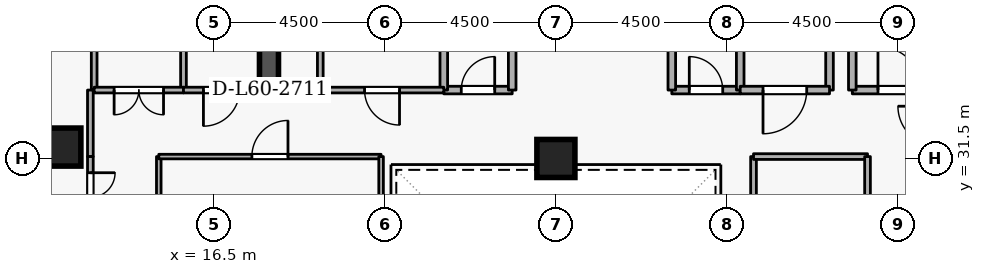
"""IFC4 building model, lengths in metres.
Left out: names, types, materials, properties, quantities, classifications, styles, units other than length and angle.
Written with IfcOpenShell. Run it as: python <this file> out.ifc"""

import sys

from ifc_helpers import new_model, si_unit, direction, frame, frame_2d, origin, origin_2d, place, context, subcontext, project, spatial, rectangle, extrude, element, fill, save


model = new_model("IFC4")
c1 = context("Model", 3, precision=1e-05, world=origin(), true_north=direction((0.0, 1.0)))
c2 = subcontext(c1, "Body", "Model", "MODEL_VIEW")
j1 = project(units=[si_unit("LENGTHUNIT", "METRE"), si_unit("PLANEANGLEUNIT", "RADIAN")], contexts=[c1])
p1 = place(None, origin())
s1 = spatial("IfcSite", under=j1, at=p1, CompositionType="ELEMENT")
p2 = place(p1, origin())
s2 = spatial("IfcBuilding", under=s1, at=p2, CompositionType="ELEMENT")
p3 = place(p2, frame((0.0, 0.0, 225.9)))
s3 = spatial("IfcBuildingStorey", under=s2, at=p3, CompositionType="ELEMENT", Elevation=225.9)
p4 = place(p3, frame((17.95, 33.1, 0.0), z_axis=(0.0, 0.0, 1.0), x_axis=(0.0, 1.0, 0.0)))
e1 = element("IfcWall", 1, at=p4, inside=s3, PredefinedType="SHEAR", context=c2, shape_type="SweptSolid", body=[
    extrude(rectangle(XDim=5.8, YDim=0.5, at=frame_2d((2.9, 0.0))), origin(), (0.0, 0.0, 1.0), 3.6),
])
for number, where, z_axis, x_axis in (
    (2, (12.5, 31.8, 0.0), (0.0, 0.0, 1.0), (1.0, 0.0, 0.0)),
    (3, (25.5, 31.5, 0.0), (0.0, 0.0, 1.0), (1.0, 0.0, 0.0)),
):
    element("IfcColumn", number, at=place(p3, frame(where, z_axis=z_axis, x_axis=x_axis)), inside=s3, PredefinedType="COLUMN", context=c2, shape_type="SweptSolid", body=[
        extrude(rectangle(XDim=1.0, YDim=1.0, at=origin_2d()), origin(), (0.0, 0.0, 1.0), 3.6),
    ])
p5 = place(p3, frame((33.3, 33.3, 0.0), z_axis=(0.0, 0.0, 1.0), x_axis=(1.0, 0.0, 0.0)))
e4 = element("IfcWall", 4, at=p5, inside=s3, PredefinedType="STANDARD", context=c2, shape_type="SweptSolid", body=[
    extrude(rectangle(XDim=2.5, YDim=0.2, at=frame_2d((1.25, 0.0))), origin(), (0.0, 0.0, 1.0), 3.3),
])
p6 = place(p5, frame((0.675, 0.0, 0.0)))
e5 = element("IfcOpeningElement", 5, at=p6, cuts=e4, PredefinedType="OPENING", context=c2, shape_type="SweptSolid", body=[
    extrude(rectangle(XDim=1.15, YDim=2.1, at=frame_2d((0.575, 1.05))), frame((0.0, 0.11, 0.0), z_axis=(0.0, -1.0, 0.0), x_axis=(1.0, 0.0, 0.0)), (0.0, 0.0, 1.0), 0.22),
])
p7 = place(p3, frame((33.3, 35.6, 0.0), z_axis=(0.0, 0.0, 1.0), x_axis=(0.0, -1.0, 0.0)))
e6 = element("IfcWall", 6, at=p7, inside=s3, PredefinedType="STANDARD", context=c2, shape_type="SweptSolid", body=[
    extrude(rectangle(XDim=2.3, YDim=0.2, at=frame_2d((1.15, 0.0))), origin(), (0.0, 0.0, 1.0), 2.505),
])
p8 = place(p3, frame((22.55, 33.3, 0.0), z_axis=(0.0, 0.0, 1.0), x_axis=(1.0, 0.0, 0.0)))
e7 = element("IfcWall", 7, at=p8, inside=s3, PredefinedType="STANDARD", context=c2, shape_type="SweptSolid", body=[
    extrude(rectangle(XDim=1.8, YDim=0.2, at=frame_2d((0.9, 0.0))), origin(), (0.0, 0.0, 1.0), 3.3),
])
p9 = place(p8, frame((0.46, 0.0, 0.0)))
e8 = element("IfcOpeningElement", 8, at=p9, cuts=e7, PredefinedType="OPENING", context=c2, shape_type="SweptSolid", body=[
    extrude(rectangle(XDim=0.88, YDim=2.04, at=frame_2d((0.44, 1.02))), frame((0.0, 0.11, 0.0), z_axis=(0.0, -1.0, 0.0), x_axis=(1.0, 0.0, 0.0)), (0.0, 0.0, 1.0), 0.22),
])
for number, where, z_axis, x_axis in (
    (9, (24.35, 33.3, 0.0), (0.0, 0.0, 1.0), (0.0, 1.0, 0.0)),
    (10, (22.55, 35.35, 0.0), (0.0, 0.0, 1.0), (0.0, -1.0, 0.0)),
):
    element("IfcWall", number, at=place(p3, frame(where, z_axis=z_axis, x_axis=x_axis)), inside=s3, PredefinedType="STANDARD", context=c2, shape_type="SweptSolid", body=[
        extrude(rectangle(XDim=2.05, YDim=0.2, at=frame_2d((1.025, 0.0))), origin(), (0.0, 0.0, 1.0), 3.3),
    ])
p10 = place(p3, frame((28.55, 33.3, 0.0), z_axis=(0.0, 0.0, 1.0), x_axis=(1.0, 0.0, 0.0)))
e11 = element("IfcWall", 11, at=p10, inside=s3, PredefinedType="STANDARD", context=c2, shape_type="SweptSolid", body=[
    extrude(rectangle(XDim=1.8, YDim=0.2, at=frame_2d((0.9, 0.0))), origin(), (0.0, 0.0, 1.0), 3.3),
])
p11 = place(p10, frame((0.46, 0.0, 0.0)))
e12 = element("IfcOpeningElement", 12, at=p11, cuts=e11, PredefinedType="OPENING", context=c2, shape_type="SweptSolid", body=[
    extrude(rectangle(XDim=0.88, YDim=2.04, at=frame_2d((0.44, 1.02))), frame((0.0, 0.11, 0.0), z_axis=(0.0, -1.0, 0.0), x_axis=(1.0, 0.0, 0.0)), (0.0, 0.0, 1.0), 0.22),
])
for number, where, z_axis, x_axis in (
    (13, (30.35, 33.3, 0.0), (0.0, 0.0, 1.0), (0.0, 1.0, 0.0)),
    (14, (28.55, 35.35, 0.0), (0.0, 0.0, 1.0), (0.0, -1.0, 0.0)),
):
    element("IfcWall", number, at=place(p3, frame(where, z_axis=z_axis, x_axis=x_axis)), inside=s3, PredefinedType="STANDARD", context=c2, shape_type="SweptSolid", body=[
        extrude(rectangle(XDim=2.05, YDim=0.2, at=frame_2d((1.025, 0.0))), origin(), (0.0, 0.0, 1.0), 3.3),
    ])
p12 = place(p3, frame((32.7, 35.35, 0.0), z_axis=(0.0, 0.0, 1.0), x_axis=(0.0, -1.0, 0.0)))
e15 = element("IfcWall", 15, at=p12, inside=s3, PredefinedType="STANDARD", context=c2, shape_type="SweptSolid", body=[
    extrude(rectangle(XDim=2.05, YDim=0.2, at=frame_2d((1.025, 0.0))), origin(), (0.0, 0.0, 1.0), 2.505),
])
p13 = place(p3, frame((32.7, 33.3, 0.0), z_axis=(0.0, 0.0, 1.0), x_axis=(-1.0, 0.0, 0.0)))
e16 = element("IfcWall", 16, at=p13, inside=s3, PredefinedType="STANDARD", context=c2, shape_type="SweptSolid", body=[
    extrude(rectangle(XDim=2.35, YDim=0.2, at=frame_2d((1.175, 0.0))), origin(), (0.0, 0.0, 1.0), 3.3),
])
p14 = place(p13, frame((0.6, 0.0, 0.0)))
e17 = element("IfcOpeningElement", 17, at=p14, cuts=e16, PredefinedType="OPENING", context=c2, shape_type="SweptSolid", body=[
    extrude(rectangle(XDim=1.15, YDim=2.1, at=frame_2d((0.575, 1.05))), frame((0.0, 0.11, 0.0), z_axis=(0.0, -1.0, 0.0), x_axis=(1.0, 0.0, 0.0)), (0.0, 0.0, 1.0), 0.22),
])
p15 = place(p3, frame((19.3, 33.3, 0.0), z_axis=(0.0, 0.0, 1.0), x_axis=(0.0, 1.0, 0.0)))
e18 = element("IfcWall", 18, at=p15, inside=s3, PredefinedType="PARTITIONING", context=c2, shape_type="SweptSolid", body=[
    extrude(rectangle(XDim=2.05, YDim=0.15, at=frame_2d((1.025, 0.0))), origin(), (0.0, 0.0, 1.0), 3.3),
])
p16 = place(p3, frame((22.55, 33.3, 0.0), z_axis=(0.0, 0.0, 1.0), x_axis=(-1.0, 0.0, 0.0)))
e19 = element("IfcWall", 19, at=p16, inside=s3, PredefinedType="PARTITIONING", context=c2, shape_type="SweptSolid", body=[
    extrude(rectangle(XDim=3.25, YDim=0.15, at=frame_2d((1.625, 0.0))), origin(), (0.0, 0.0, 1.0), 3.3),
])
p17 = place(p16, frame((1.165, 0.0, 0.0)))
e20 = element("IfcOpeningElement", 20, at=p17, cuts=e19, PredefinedType="OPENING", context=c2, shape_type="SweptSolid", body=[
    extrude(rectangle(XDim=0.92, YDim=2.08, at=frame_2d((0.46, 1.04))), frame((0.0, 0.085, 0.0), z_axis=(0.0, -1.0, 0.0), x_axis=(1.0, 0.0, 0.0)), (0.0, 0.0, 1.0), 0.17),
])
for number, where, z_axis, x_axis in (
    (21, (13.35, 33.3, 0.0), (0.0, 0.0, 1.0), (0.0, 1.0, 0.0)),
    (22, (15.7, 50.72, 0.0), (0.0, 0.0, 1.0), (0.0, -1.0, 0.0)),
):
    element("IfcWall", number, at=place(p3, frame(where, z_axis=z_axis, x_axis=x_axis)), inside=s3, PredefinedType="PARTITIONING", context=c2, shape_type="SweptSolid", body=[
        extrude(rectangle(XDim=17.42, YDim=0.15, at=frame_2d((8.71, 0.0))), origin(), (0.0, 0.0, 1.0), 3.3),
    ])
p18 = place(p3, frame((15.7, 33.3, 0.0), z_axis=(0.0, 0.0, 1.0), x_axis=(-1.0, 0.0, 0.0)))
e23 = element("IfcWall", 23, at=p18, inside=s3, PredefinedType="PARTITIONING", context=c2, shape_type="SweptSolid", body=[
    extrude(rectangle(XDim=2.35, YDim=0.15, at=frame_2d((1.175, 0.0))), origin(), (0.0, 0.0, 1.0), 3.3),
])
p19 = place(p18, frame((0.525, 0.0, 0.0)))
e24 = element("IfcOpeningElement", 24, at=p19, cuts=e23, PredefinedType="OPENING", context=c2, shape_type="SweptSolid", body=[
    extrude(rectangle(XDim=1.3, YDim=2.12, at=frame_2d((0.65, 1.06))), frame((0.0, 0.085, 0.0), z_axis=(0.0, -1.0, 0.0), x_axis=(1.0, 0.0, 0.0)), (0.0, 0.0, 1.0), 0.17),
])
p20 = place(p3, frame((17.7, 33.3, 0.0), z_axis=(0.0, 0.0, 1.0), x_axis=(-1.0, 0.0, 0.0)))
e25 = element("IfcWall", 25, at=p20, inside=s3, PredefinedType="PARTITIONING", context=c2, shape_type="SweptSolid", body=[
    extrude(rectangle(XDim=2.0, YDim=0.15, at=frame_2d((1.0, 0.0))), origin(), (0.0, 0.0, 1.0), 3.3),
])
p21 = place(p20, frame((0.525, 0.0, 0.0)))
e26 = element("IfcOpeningElement", 26, at=p21, cuts=e25, PredefinedType="OPENING", context=c2, shape_type="SweptSolid", body=[
    extrude(rectangle(XDim=0.95, YDim=2.1, at=frame_2d((0.475, 1.05))), frame((0.0, 0.085, 0.0), z_axis=(0.0, -1.0, 0.0), x_axis=(1.0, 0.0, 0.0)), (0.0, 0.0, 1.0), 0.17),
])
p22 = place(p3, frame((13.25, 33.3, 0.0), z_axis=(0.0, 0.0, 1.0), x_axis=(0.0, -1.0, 0.0)))
e27 = element("IfcWall", 27, at=p22, inside=s3, PredefinedType="PARTITIONING", context=c2, shape_type="SweptSolid", body=[
    extrude(rectangle(XDim=1.75, YDim=0.15, at=frame_2d((0.875, 0.0))), origin(), (0.0, 0.0, 1.0), 3.3),
])
p23 = place(p3, frame((13.25, 31.55, 0.0), z_axis=(0.0, 0.0, 1.0), x_axis=(0.0, -1.0, 0.0)))
e28 = element("IfcWall", 28, at=p23, inside=s3, PredefinedType="PARTITIONING", context=c2, shape_type="SweptSolid", body=[
    extrude(rectangle(XDim=2.15, YDim=0.15, at=frame_2d((1.075, 0.0))), origin(), (0.0, 0.0, 1.0), 3.3),
])
p24 = place(p23, frame((0.425, 0.0, 0.0)))
e29 = element("IfcOpeningElement", 29, at=p24, cuts=e28, PredefinedType="OPENING", context=c2, shape_type="SweptSolid", body=[
    extrude(rectangle(XDim=1.3, YDim=2.12, at=frame_2d((0.65, 1.06))), frame((0.0, 0.085, 0.0), z_axis=(0.0, -1.0, 0.0), x_axis=(1.0, 0.0, 0.0)), (0.0, 0.0, 1.0), 0.17),
])
p25 = place(p3, frame((15.05, 26.2, 0.0), z_axis=(0.0, 0.0, 1.0), x_axis=(0.0, 1.0, 0.0)))
e30 = element("IfcWall", 30, at=p25, inside=s3, PredefinedType="PARTITIONING", context=c2, shape_type="SweptSolid", body=[
    extrude(rectangle(XDim=5.35, YDim=0.12, at=frame_2d((2.675, 0.0))), origin(), (0.0, 0.0, 1.0), 3.3),
])
p26 = place(p3, frame((15.05, 31.55, 0.0), z_axis=(0.0, 0.0, 1.0), x_axis=(1.0, 0.0, 0.0)))
e31 = element("IfcWall", 31, at=p26, inside=s3, PredefinedType="PARTITIONING", context=c2, shape_type="SweptSolid", body=[
    extrude(rectangle(XDim=5.85, YDim=0.12, at=frame_2d((2.925, 0.0))), origin(), (0.0, 0.0, 1.0), 3.3),
])
p27 = place(p26, frame((2.45, 0.0, 0.0)))
e32 = element("IfcOpeningElement", 32, at=p27, cuts=e31, PredefinedType="OPENING", context=c2, shape_type="SweptSolid", body=[
    extrude(rectangle(XDim=0.95, YDim=2.1, at=frame_2d((0.475, 1.05))), frame((0.0, 0.07, 0.0), z_axis=(0.0, -1.0, 0.0), x_axis=(1.0, 0.0, 0.0)), (0.0, 0.0, 1.0), 0.14),
])
p28 = place(p3, frame((20.9, 31.55, 0.0), z_axis=(0.0, 0.0, 1.0), x_axis=(0.0, -1.0, 0.0)))
e33 = element("IfcWall", 33, at=p28, inside=s3, PredefinedType="PARTITIONING", context=c2, shape_type="SweptSolid", body=[
    extrude(rectangle(XDim=5.35, YDim=0.12, at=frame_2d((2.675, 0.0))), origin(), (0.0, 0.0, 1.0), 3.3),
])
p29 = place(p3, frame((30.7, 27.55, 0.0), z_axis=(0.0, 0.0, 1.0), x_axis=(0.0, 1.0, 0.0)))
e34 = element("IfcWall", 34, at=p29, inside=s3, PredefinedType="PARTITIONING", context=c2, shape_type="SweptSolid", body=[
    extrude(rectangle(XDim=4.0, YDim=0.15, at=frame_2d((2.0, 0.0))), origin(), (0.0, 0.0, 1.0), 3.3),
])
p30 = place(p3, frame((30.7, 31.55, 0.0), z_axis=(0.0, 0.0, 1.0), x_axis=(1.0, 0.0, 0.0)))
e35 = element("IfcWall", 35, at=p30, inside=s3, PredefinedType="PARTITIONING", context=c2, shape_type="SweptSolid", body=[
    extrude(rectangle(XDim=3.0, YDim=0.15, at=frame_2d((1.5, 0.0))), origin(), (0.0, 0.0, 1.0), 3.3),
])
p31 = place(p3, frame((33.7, 31.55, 0.0), z_axis=(0.0, 0.0, 1.0), x_axis=(0.0, -1.0, 0.0)))
e36 = element("IfcWall", 36, at=p31, inside=s3, PredefinedType="PARTITIONING", context=c2, shape_type="SweptSolid", body=[
    extrude(rectangle(XDim=4.0, YDim=0.15, at=frame_2d((2.0, 0.0))), origin(), (0.0, 0.0, 1.0), 3.3),
])
p32 = place(p31, frame((1.35, 0.0, 0.0)))
e37 = element("IfcOpeningElement", 37, at=p32, cuts=e36, PredefinedType="OPENING", context=c2, shape_type="SweptSolid", body=[
    extrude(rectangle(XDim=1.3, YDim=2.12, at=frame_2d((0.65, 1.06))), frame((0.0, 0.085, 0.0), z_axis=(0.0, -1.0, 0.0), x_axis=(1.0, 0.0, 0.0)), (0.0, 0.0, 1.0), 0.17),
])
p33 = place(p6, origin())
e38 = element("IfcDoor", 38, at=p33, inside=s3, OperationType="SINGLE_SWING_LEFT", PredefinedType="DOOR", context=c2, shape_type="SweptSolid", body=[
    extrude(rectangle(XDim=1.15, YDim=2.1, at=frame_2d((0.575, 1.05))), frame((0.0, 0.025, 0.0), z_axis=(0.0, -1.0, 0.0), x_axis=(1.0, 0.0, 0.0)), (0.0, 0.0, 1.0), 0.05),
])
fill(e5, e38)
p34 = place(p9, origin())
e39 = element("IfcDoor", 39, at=p34, inside=s3, OperationType="SINGLE_SWING_RIGHT", PredefinedType="DOOR", context=c2, shape_type="SweptSolid", body=[
    extrude(rectangle(XDim=0.88, YDim=2.04, at=frame_2d((0.44, 1.02))), frame((0.0, 0.025, 0.0), z_axis=(0.0, -1.0, 0.0), x_axis=(1.0, 0.0, 0.0)), (0.0, 0.0, 1.0), 0.05),
])
fill(e8, e39)
p35 = place(p11, origin())
e40 = element("IfcDoor", 40, at=p35, inside=s3, OperationType="SINGLE_SWING_LEFT", PredefinedType="DOOR", context=c2, shape_type="SweptSolid", body=[
    extrude(rectangle(XDim=0.88, YDim=2.04, at=frame_2d((0.44, 1.02))), frame((0.0, 0.025, 0.0), z_axis=(0.0, -1.0, 0.0), x_axis=(1.0, 0.0, 0.0)), (0.0, 0.0, 1.0), 0.05),
])
fill(e12, e40)
p36 = place(p17, origin())
e41 = element("IfcDoor", 41, at=p36, inside=s3, OperationType="SINGLE_SWING_LEFT", PredefinedType="DOOR", context=c2, shape_type="SweptSolid", body=[
    extrude(rectangle(XDim=0.92, YDim=2.08, at=frame_2d((0.46, 1.04))), frame((0.0, 0.025, 0.0), z_axis=(0.0, -1.0, 0.0), x_axis=(1.0, 0.0, 0.0)), (0.0, 0.0, 1.0), 0.05),
])
fill(e20, e41)
p37 = place(p14, origin())
e42 = element("IfcDoor", 42, at=p37, inside=s3, OperationType="SINGLE_SWING_RIGHT", PredefinedType="DOOR", context=c2, shape_type="SweptSolid", body=[
    extrude(rectangle(XDim=1.15, YDim=2.1, at=frame_2d((0.575, 1.05))), frame((0.0, 0.025, 0.0), z_axis=(0.0, -1.0, 0.0), x_axis=(1.0, 0.0, 0.0)), (0.0, 0.0, 1.0), 0.05),
])
fill(e17, e42)
p38 = place(p19, origin())
e43 = element("IfcDoor", 43, at=p38, inside=s3, OperationType="DOUBLE_DOOR_SINGLE_SWING", PredefinedType="DOOR", context=c2, shape_type="SweptSolid", body=[
    extrude(rectangle(XDim=1.3, YDim=2.12, at=frame_2d((0.65, 1.06))), frame((0.0, 0.025, 0.0), z_axis=(0.0, -1.0, 0.0), x_axis=(1.0, 0.0, 0.0)), (0.0, 0.0, 1.0), 0.05),
])
fill(e24, e43)
p39 = place(p21, origin())
e44 = element("IfcDoor", 44, at=p39, inside=s3, OperationType="SINGLE_SWING_RIGHT", PredefinedType="DOOR", context=c2, shape_type="SweptSolid", body=[
    extrude(rectangle(XDim=0.95, YDim=2.1, at=frame_2d((0.475, 1.05))), frame((0.0, 0.025, 0.0), z_axis=(0.0, -1.0, 0.0), x_axis=(1.0, 0.0, 0.0)), (0.0, 0.0, 1.0), 0.05),
])
fill(e26, e44)
p40 = place(p24, origin())
e45 = element("IfcDoor", 45, at=p40, inside=s3, OperationType="DOUBLE_DOOR_SINGLE_SWING", PredefinedType="DOOR", context=c2, shape_type="SweptSolid", body=[
    extrude(rectangle(XDim=1.3, YDim=2.12, at=frame_2d((0.65, 1.06))), frame((0.0, 0.025, 0.0), z_axis=(0.0, -1.0, 0.0), x_axis=(1.0, 0.0, 0.0)), (0.0, 0.0, 1.0), 0.05),
])
fill(e29, e45)
p41 = place(p27, origin())
e46 = element("IfcDoor", 46, at=p41, inside=s3, OperationType="SINGLE_SWING_RIGHT", PredefinedType="DOOR", context=c2, shape_type="SweptSolid", body=[
    extrude(rectangle(XDim=0.95, YDim=2.1, at=frame_2d((0.475, 1.05))), frame((0.0, 0.025, 0.0), z_axis=(0.0, -1.0, 0.0), x_axis=(1.0, 0.0, 0.0)), (0.0, 0.0, 1.0), 0.05),
])
fill(e32, e46)
save(model, sys.argv[1])
